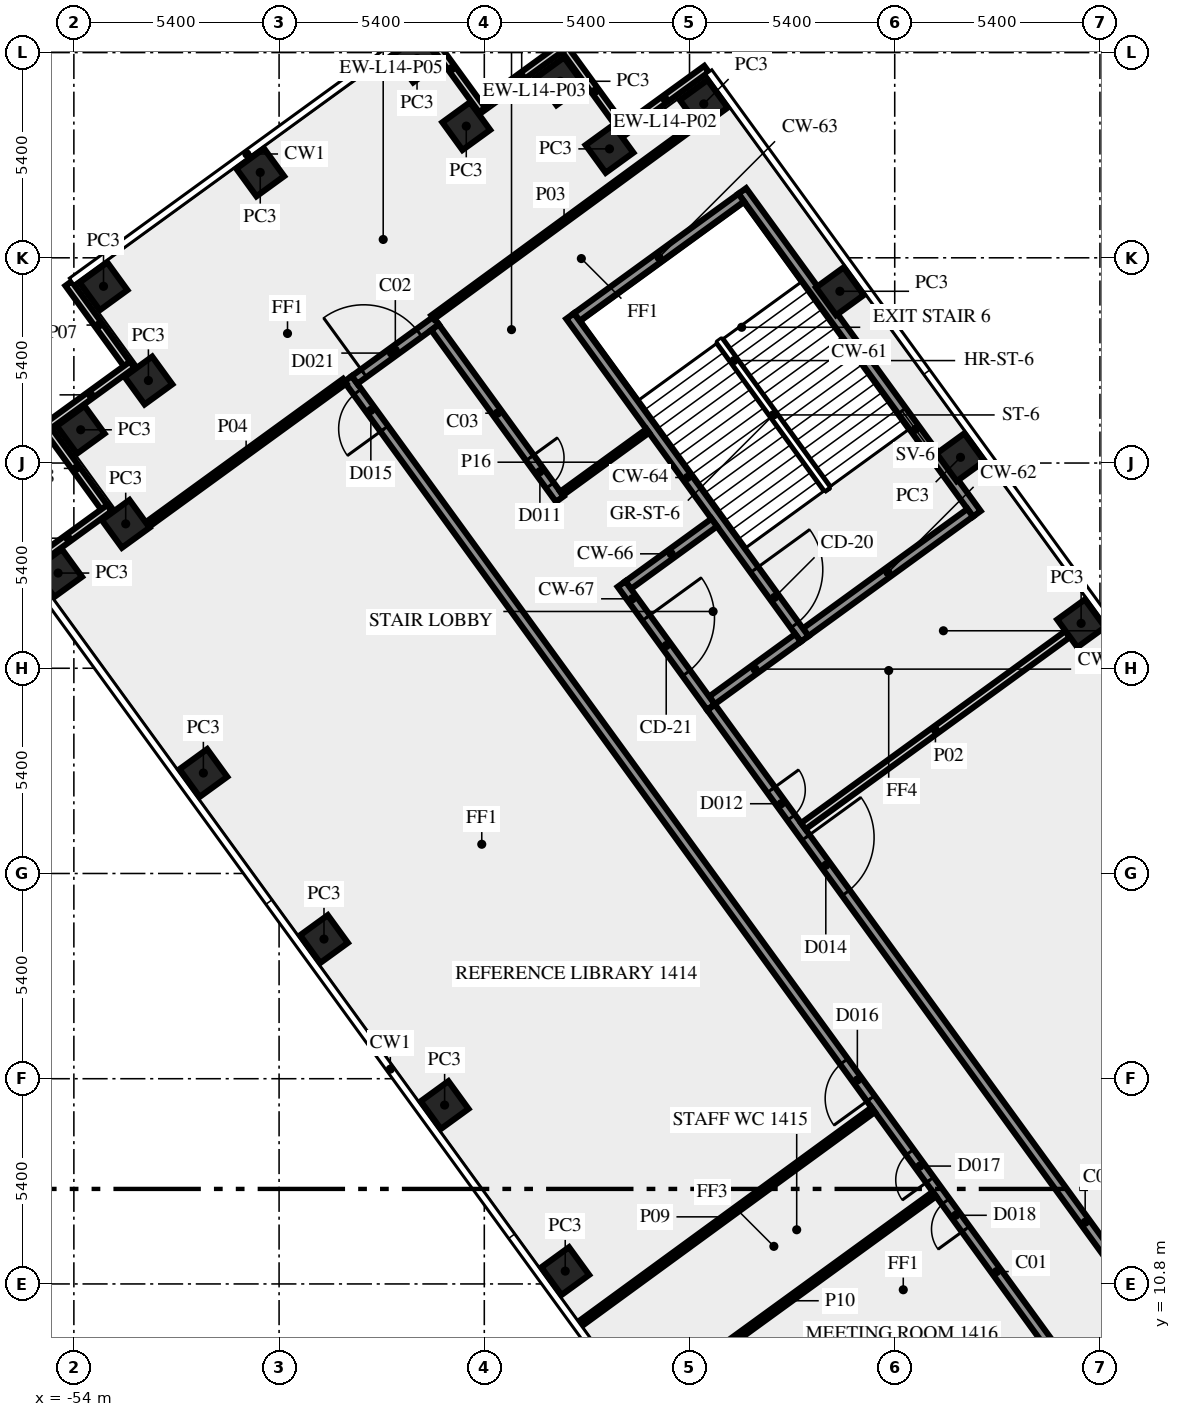
"""IFC4 building model, lengths in metres.
Left out: names, types, materials, properties, quantities, classifications, styles, units other than length and angle.
Written with IfcOpenShell. Run it as: python <this file> out.ifc"""

import sys

from ifc_helpers import new_model, si_unit, direction, frame, frame_2d, origin, origin_2d, place, context, subcontext, project, spatial, rectangle, extrude, element, fill, save


model = new_model("IFC4")
c1 = context("Model", 3, precision=1e-05, world=origin(), true_north=direction((0.0, 1.0)))
c2 = subcontext(c1, "Body", "Model", "MODEL_VIEW")
j1 = project(units=[si_unit("LENGTHUNIT", "METRE"), si_unit("PLANEANGLEUNIT", "RADIAN")], contexts=[c1])
p1 = place(None, origin())
s1 = spatial("IfcSite", under=j1, at=p1, CompositionType="ELEMENT")
p2 = place(p1, origin())
s2 = spatial("IfcBuilding", under=s1, at=p2, CompositionType="ELEMENT")
p3 = place(p2, frame((0.0, 0.0, 63.0)))
s3 = spatial("IfcBuildingStorey", under=s2, at=p3, CompositionType="ELEMENT", Elevation=63.0)
for number, where, z_axis, x_axis in (
    (1, (-27.495, 28.181, 0.0), (0.0, 0.0, 1.0), (-0.588, 0.809, 0.0)),
    (2, (-30.669, 32.55, 0.0), (0.0, 0.0, 1.0), (-0.588, 0.809, 0.0)),
    (3, (-33.843, 36.919, 0.0), (0.0, 0.0, 1.0), (-0.588, 0.809, 0.0)),
    (4, (-37.425, 41.85, 0.0), (0.0, 0.0, 1.0), (-0.588, 0.809, 0.0)),
    (5, (-39.906, 40.666, 0.0), (0.0, 0.0, 1.0), (-0.588, 0.809, 0.0)),
    (6, (-41.2, 42.445, 0.0), (0.0, 0.0, 1.0), (-0.588, 0.809, 0.0)),
    (7, (-43.675, 41.265, 0.0), (0.0, 0.0, 1.0), (-0.809, -0.588, 0.0)),
    (8, (-44.97, 43.045, 0.0), (0.0, 0.0, 1.0), (-0.809, -0.588, 0.0)),
    (9, (-49.096, 40.047, 0.0), (0.0, 0.0, 1.0), (-0.809, -0.588, 0.0)),
    (10, (-53.22, 37.05, 0.0), (0.0, 0.0, 1.0), (0.588, -0.809, 0.0)),
    (11, (-52.039, 34.571, 0.0), (0.0, 0.0, 1.0), (-0.809, -0.588, 0.0)),
    (12, (-53.82, 33.275, 0.0), (0.0, 0.0, 1.0), (0.588, -0.809, 0.0)),
    (13, (-52.636, 30.8, 0.0), (0.0, 0.0, 1.0), (-0.809, -0.588, 0.0)),
    (14, (-54.415, 29.505, 0.0), (0.0, 0.0, 1.0), (0.588, -0.809, 0.0)),
    (15, (-50.592, 24.243, 0.0), (0.0, 0.0, 1.0), (0.588, -0.809, 0.0)),
    (16, (-47.418, 19.875, 0.0), (0.0, 0.0, 1.0), (0.588, -0.809, 0.0)),
    (17, (-44.244, 15.506, 0.0), (0.0, 0.0, 1.0), (0.588, -0.809, 0.0)),
    (18, (-41.07, 11.137, 0.0), (0.0, 0.0, 1.0), (0.588, -0.809, 0.0)),
):
    element("IfcColumn", number, at=place(p3, frame(where, z_axis=z_axis, x_axis=x_axis)), inside=s3, PredefinedType="COLUMN", context=c2, shape_type="SweptSolid", body=[
        extrude(rectangle(XDim=0.9, YDim=0.9, at=origin_2d()), origin(), (0.0, 0.0, 1.0), 3.65),
    ])
p4 = place(p3, frame((-37.353, 42.768, 0.0), z_axis=(0.0, 0.0, 1.0), x_axis=(-0.809033161865, -0.587762999008, 0.0)))
e19 = element("IfcWall", 19, at=p4, inside=s3, PredefinedType="SOLIDWALL", context=c2, shape_type="SweptSolid", body=[
    extrude(rectangle(XDim=2.7, YDim=0.2, at=frame_2d((1.35, 0.0))), origin(), (0.0, 0.0, 1.0), 3.65),
])
p5 = place(p3, frame((-39.488, 41.094, 0.0), z_axis=(0.0, 0.0, 1.0), x_axis=(-0.587806000234, 0.809001919707, 0.0)))
e20 = element("IfcWall", 20, at=p5, inside=s3, PredefinedType="SOLIDWALL", context=c2, shape_type="SweptSolid", body=[
    extrude(rectangle(XDim=2.7, YDim=0.2, at=frame_2d((1.35, 0.0))), origin(), (0.0, 0.0, 1.0), 3.65),
])
for number, where, z_axis, x_axis in (
    (21, (-41.124, 43.366, 0.0), (0.0, 0.0, 1.0), (-0.809, -0.588, 0.0)),
    (22, (-43.259, 41.691, 0.0), (0.0, 0.0, 1.0), (-0.588, 0.809, 0.0)),
    (23, (-54.14, 37.123, 0.0), (0.0, 0.0, 1.0), (0.588, -0.809, 0.0)),
    (24, (-52.465, 34.987, 0.0), (0.0, 0.0, 1.0), (-0.809, -0.588, 0.0)),
):
    element("IfcWall", number, at=place(p3, frame(where, z_axis=z_axis, x_axis=x_axis)), inside=s3, PredefinedType="SOLIDWALL", context=c2, shape_type="SweptSolid", body=[
        extrude(rectangle(XDim=2.7, YDim=0.2, at=frame_2d((1.35, 0.0))), origin(), (0.0, 0.0, 1.0), 3.65),
    ])
p6 = place(p3, frame((-54.738, 33.351, 0.0), z_axis=(0.0, 0.0, 1.0), x_axis=(0.587779184282, -0.809021403008, 0.0)))
e25 = element("IfcWall", 25, at=p6, inside=s3, PredefinedType="SOLIDWALL", context=c2, shape_type="SweptSolid", body=[
    extrude(rectangle(XDim=2.7, YDim=0.2, at=frame_2d((1.35, 0.0))), origin(), (0.0, 0.0, 1.0), 3.65),
])
p7 = place(p3, frame((-53.063, 31.216, 0.0), z_axis=(0.0, 0.0, 1.0), x_axis=(-0.809033161865, -0.587762999008, 0.0)))
e26 = element("IfcWall", 26, at=p7, inside=s3, PredefinedType="SOLIDWALL", context=c2, shape_type="SweptSolid", body=[
    extrude(rectangle(XDim=2.7, YDim=0.2, at=frame_2d((1.35, 0.0))), origin(), (0.0, 0.0, 1.0), 3.65),
])
p8 = place(p3, frame((-30.24, 31.064, 0.0), z_axis=(0.0, 0.0, 1.0), x_axis=(-0.587795589702, 0.809009483706, 0.0)))
e27 = element("IfcWall", 27, at=p8, inside=s3, PredefinedType="SHEAR", context=c2, shape_type="SweptSolid", body=[
    extrude(rectangle(XDim=10.5, YDim=0.25, at=frame_2d((5.25, 0.0))), origin(), (0.0, 0.0, 1.0), 3.65),
])
p9 = place(p8, frame((2.15, 0.0, 1.0)))
e28 = element("IfcOpeningElement", 28, at=p9, cuts=e27, PredefinedType="OPENING", context=c2, shape_type="SweptSolid", body=[
    extrude(rectangle(XDim=1.2, YDim=1.2, at=frame_2d((0.6, 0.6))), frame((0.0, 0.135, 0.0), z_axis=(0.0, -1.0, 0.0), x_axis=(1.0, 0.0, 0.0)), (0.0, 0.0, 1.0), 0.27),
])
p10 = place(p3, frame((-30.414, 31.092, 0.0), z_axis=(0.0, 0.0, 1.0), x_axis=(-0.8089984606, -0.587810760999, 0.0)))
e29 = element("IfcWall", 29, at=p10, inside=s3, PredefinedType="SHEAR", context=c2, shape_type="SweptSolid", body=[
    extrude(rectangle(XDim=5.35, YDim=0.25, at=frame_2d((2.675, 0.0))), origin(), (0.0, 0.0, 1.0), 3.65),
])
p11 = place(p3, frame((-36.439, 39.384, 0.0), z_axis=(0.0, 0.0, 1.0), x_axis=(-0.809020161303, -0.587780893365, 0.0)))
e30 = element("IfcWall", 30, at=p11, inside=s3, PredefinedType="SHEAR", context=c2, shape_type="SweptSolid", body=[
    extrude(rectangle(XDim=5.35, YDim=0.25, at=frame_2d((2.675, 0.0))), origin(), (0.0, 0.0, 1.0), 3.65),
])
p12 = place(p3, frame((-40.942, 36.267, 0.0), z_axis=(0.0, 0.0, 1.0), x_axis=(0.587795589702, -0.809009483706, 0.0)))
e31 = element("IfcWall", 31, at=p12, inside=s3, PredefinedType="SHEAR", context=c2, shape_type="SweptSolid", body=[
    extrude(rectangle(XDim=10.5, YDim=0.25, at=frame_2d((5.25, 0.0))), origin(), (0.0, 0.0, 1.0), 3.65),
])
p13 = place(p12, frame((8.25, 0.0, 0.0)))
e32 = element("IfcOpeningElement", 32, at=p13, cuts=e31, PredefinedType="OPENING", context=c2, shape_type="SweptSolid", body=[
    extrude(rectangle(XDim=1.8, YDim=2.1, at=frame_2d((0.9, 1.05))), frame((0.0, 0.135, 0.0), z_axis=(0.0, -1.0, 0.0), x_axis=(1.0, 0.0, 0.0)), (0.0, 0.0, 1.0), 0.27),
])
for number, where, z_axis, x_axis in (
    (33, (-34.945, 27.8, 0.0), (0.0, 0.0, 1.0), (-0.809, -0.588, 0.0)),
    (34, (-37.149, 30.834, 0.0), (0.0, 0.0, 1.0), (-0.809, -0.588, 0.0)),
):
    element("IfcWall", number, at=place(p3, frame(where, z_axis=z_axis, x_axis=x_axis)), inside=s3, PredefinedType="SHEAR", context=c2, shape_type="SweptSolid", body=[
        extrude(rectangle(XDim=2.8, YDim=0.25, at=frame_2d((1.4, 0.0))), origin(), (0.0, 0.0, 1.0), 3.65),
    ])
p14 = place(p3, frame((-39.589, 29.216, 0.0), z_axis=(0.0, 0.0, 1.0), x_axis=(0.587772420479, -0.809026317077, 0.0)))
e35 = element("IfcWall", 35, at=p14, inside=s3, PredefinedType="SHEAR", context=c2, shape_type="SweptSolid", body=[
    extrude(rectangle(XDim=4.0, YDim=0.25, at=frame_2d((2.0, 0.0))), origin(), (0.0, 0.0, 1.0), 3.65),
])
p15 = place(p14, frame((1.1, 0.0, 0.0)))
e36 = element("IfcOpeningElement", 36, at=p15, cuts=e35, PredefinedType="OPENING", context=c2, shape_type="SweptSolid", body=[
    extrude(rectangle(XDim=1.8, YDim=2.1, at=frame_2d((0.9, 1.05))), frame((0.0, 0.135, 0.0), z_axis=(0.0, -1.0, 0.0), x_axis=(1.0, 0.0, 0.0)), (0.0, 0.0, 1.0), 0.27),
])
p16 = place(p3, frame((-20.531, -1.523, 0.0), z_axis=(0.0, 0.0, 1.0), x_axis=(-0.587784593204, 0.809017473231, 0.0)))
e37 = element("IfcWall", 37, at=p16, inside=s3, PredefinedType="SOLIDWALL", context=c2, shape_type="SweptSolid", body=[
    extrude(rectangle(XDim=44.67, YDim=0.25, at=frame_2d((22.335, 0.0))), origin(), (0.0, 0.0, 1.0), 3.65),
])
p17 = place(p16, frame((43.046, 0.0, 0.0)))
e38 = element("IfcOpeningElement", 38, at=p17, cuts=e37, PredefinedType="OPENING", context=c2, shape_type="SweptSolid", body=[
    extrude(rectangle(XDim=1.2, YDim=2.1, at=frame_2d((0.6, 1.05))), frame((0.0, 0.135, 0.0), z_axis=(0.0, -1.0, 0.0), x_axis=(1.0, 0.0, 0.0)), (0.0, 0.0, 1.0), 0.27),
])
p18 = place(p16, frame((21.266, 0.0, 0.0)))
e39 = element("IfcOpeningElement", 39, at=p18, cuts=e37, PredefinedType="OPENING", context=c2, shape_type="SweptSolid", body=[
    extrude(rectangle(XDim=1.2, YDim=2.1, at=frame_2d((0.6, 1.05))), frame((0.0, 0.135, 0.0), z_axis=(0.0, -1.0, 0.0), x_axis=(1.0, 0.0, 0.0)), (0.0, 0.0, 1.0), 0.27),
])
p19 = place(p16, frame((17.015, 0.0, 0.0)))
e40 = element("IfcOpeningElement", 40, at=p19, cuts=e37, PredefinedType="OPENING", context=c2, shape_type="SweptSolid", body=[
    extrude(rectangle(XDim=0.9, YDim=2.1, at=frame_2d((0.45, 1.05))), frame((0.0, 0.135, 0.0), z_axis=(0.0, -1.0, 0.0), x_axis=(1.0, 0.0, 0.0)), (0.0, 0.0, 1.0), 0.27),
])
p20 = place(p16, frame((2.924, 0.0, 0.0)))
e41 = element("IfcOpeningElement", 41, at=p20, cuts=e37, PredefinedType="OPENING", context=c2, shape_type="SweptSolid", body=[
    extrude(rectangle(XDim=1.8, YDim=2.1, at=frame_2d((0.9, 1.05))), frame((0.0, 0.135, 0.0), z_axis=(0.0, -1.0, 0.0), x_axis=(1.0, 0.0, 0.0)), (0.0, 0.0, 1.0), 0.27),
])
p21 = place(p16, frame((18.616, 0.0, 0.0)))
e42 = element("IfcOpeningElement", 42, at=p21, cuts=e37, PredefinedType="OPENING", context=c2, shape_type="SweptSolid", body=[
    extrude(rectangle(XDim=0.9, YDim=2.1, at=frame_2d((0.45, 1.05))), frame((0.0, 0.135, 0.0), z_axis=(0.0, -1.0, 0.0), x_axis=(1.0, 0.0, 0.0)), (0.0, 0.0, 1.0), 0.27),
])
p22 = place(p16, frame((7.816, 0.0, 0.0)))
e43 = element("IfcOpeningElement", 43, at=p22, cuts=e37, PredefinedType="OPENING", context=c2, shape_type="SweptSolid", body=[
    extrude(rectangle(XDim=0.9, YDim=2.1, at=frame_2d((0.45, 1.05))), frame((0.0, 0.135, 0.0), z_axis=(0.0, -1.0, 0.0), x_axis=(1.0, 0.0, 0.0)), (0.0, 0.0, 1.0), 0.27),
])
p23 = place(p3, frame((-46.613, 34.588, 0.0), z_axis=(0.0, 0.0, 1.0), x_axis=(0.808994936898, 0.587815610607, 0.0)))
e44 = element("IfcWall", 44, at=p23, inside=s3, PredefinedType="SOLIDWALL", context=c2, shape_type="SweptSolid", body=[
    extrude(rectangle(XDim=2.65, YDim=0.25, at=frame_2d((1.325, 0.0))), origin(), (0.0, 0.0, 1.0), 3.65),
])
p24 = place(p23, frame((0.299, 0.0, 0.0)))
e45 = element("IfcOpeningElement", 45, at=p24, cuts=e44, PredefinedType="OPENING", context=c2, shape_type="SweptSolid", body=[
    extrude(rectangle(XDim=1.8, YDim=2.1, at=frame_2d((0.9, 1.05))), frame((0.0, 0.135, 0.0), z_axis=(0.0, -1.0, 0.0), x_axis=(1.0, 0.0, 0.0)), (0.0, 0.0, 1.0), 0.27),
])
p25 = place(p3, frame((-44.497, 35.971, 0.0), z_axis=(0.0, 0.0, 1.0), x_axis=(0.587742866856, -0.809047787501, 0.0)))
e46 = element("IfcWall", 46, at=p25, inside=s3, PredefinedType="SOLIDWALL", context=c2, shape_type="SweptSolid", body=[
    extrude(rectangle(XDim=5.586, YDim=0.25, at=frame_2d((2.793, 0.0))), origin(), (0.0, 0.0, 1.0), 3.65),
])
p26 = place(p25, frame((4.245, 0.0, 0.0)))
e47 = element("IfcOpeningElement", 47, at=p26, cuts=e46, PredefinedType="OPENING", context=c2, shape_type="SweptSolid", body=[
    extrude(rectangle(XDim=0.9, YDim=2.1, at=frame_2d((0.45, 1.05))), frame((0.0, 0.135, 0.0), z_axis=(0.0, -1.0, 0.0), x_axis=(1.0, 0.0, 0.0)), (0.0, 0.0, 1.0), 0.27),
])
p27 = place(p3, frame((-37.232, 25.972, 0.0), z_axis=(0.0, 0.0, 1.0), x_axis=(0.587786323093, -0.809016216391, 0.0)))
e48 = element("IfcWall", 48, at=p27, inside=s3, PredefinedType="SOLIDWALL", context=c2, shape_type="SweptSolid", body=[
    extrude(rectangle(XDim=33.493, YDim=0.25, at=frame_2d((16.747, 0.0))), origin(), (0.0, 0.0, 1.0), 3.65),
])
p28 = place(p27, frame((28.301, 0.0, 0.0)))
e49 = element("IfcOpeningElement", 49, at=p28, cuts=e48, PredefinedType="OPENING", context=c2, shape_type="SweptSolid", body=[
    extrude(rectangle(XDim=1.8, YDim=2.1, at=frame_2d((0.9, 1.05))), frame((0.0, 0.135, 0.0), z_axis=(0.0, -1.0, 0.0), x_axis=(1.0, 0.0, 0.0)), (0.0, 0.0, 1.0), 0.27),
])
p29 = place(p27, frame((4.235, 0.0, 0.0)))
e50 = element("IfcOpeningElement", 50, at=p29, cuts=e48, PredefinedType="OPENING", context=c2, shape_type="SweptSolid", body=[
    extrude(rectangle(XDim=1.8, YDim=2.1, at=frame_2d((0.9, 1.05))), frame((0.0, 0.135, 0.0), z_axis=(0.0, -1.0, 0.0), x_axis=(1.0, 0.0, 0.0)), (0.0, 0.0, 1.0), 0.27),
])
p30 = place(p27, frame((2.685, 0.0, 0.0)))
e51 = element("IfcOpeningElement", 51, at=p30, cuts=e48, PredefinedType="OPENING", context=c2, shape_type="SweptSolid", body=[
    extrude(rectangle(XDim=0.9, YDim=2.1, at=frame_2d((0.45, 1.05))), frame((0.0, 0.135, 0.0), z_axis=(0.0, -1.0, 0.0), x_axis=(1.0, 0.0, 0.0)), (0.0, 0.0, 1.0), 0.27),
])
p31 = place(p3, frame((-27.851, 27.897, 0.0), z_axis=(0.0, 0.0, 1.0), x_axis=(-0.809030728677, -0.587766348183, 0.0)))
e52 = element("IfcWall", 52, at=p31, inside=s3, PredefinedType="SOLIDWALL", context=c2, shape_type="SweptSolid", body=[
    extrude(rectangle(XDim=8.596, YDim=0.2, at=frame_2d((4.298, 0.0))), origin(), (0.0, 0.0, 1.0), 3.65),
])
p32 = place(p3, frame((-44.559, 36.235, 0.0), z_axis=(0.0, 0.0, 1.0), x_axis=(0.806949857155, 0.590619952286, 0.0)))
e53 = element("IfcWall", 53, at=p32, inside=s3, PredefinedType="PARTITIONING", context=c2, shape_type="SweptSolid", body=[
    extrude(rectangle(XDim=8.57, YDim=0.12, at=frame_2d((4.285, 0.0))), origin(), (0.0, 0.0, 1.0), 3.65),
])
p33 = place(p3, frame((-52.062, 30.783, 0.0), z_axis=(0.0, 0.0, 1.0), x_axis=(0.808992766665, 0.58781859743, 0.0)))
e54 = element("IfcWall", 54, at=p33, inside=s3, PredefinedType="PARTITIONING", context=c2, shape_type="SweptSolid", body=[
    extrude(rectangle(XDim=6.414, YDim=0.15, at=frame_2d((3.207, 0.0))), origin(), (0.0, 0.0, 1.0), 3.65),
])
p34 = place(p3, frame((-40.68, 9.75, 0.0), z_axis=(0.0, 0.0, 1.0), x_axis=(0.807645841498, 0.589667868135, 0.0)))
e55 = element("IfcWall", 55, at=p34, inside=s3, PredefinedType="PARTITIONING", context=c2, shape_type="SweptSolid", body=[
    extrude(rectangle(XDim=9.551, YDim=0.15, at=frame_2d((4.775, 0.0))), origin(), (0.0, 0.0, 1.0), 2.75),
])
p35 = place(p3, frame((-31.356, 13.164, 0.0), z_axis=(0.0, 0.0, 1.0), x_axis=(-0.809102944047, -0.587666934526, 0.0)))
e56 = element("IfcWall", 56, at=p35, inside=s3, PredefinedType="PARTITIONING", context=c2, shape_type="SweptSolid", body=[
    extrude(rectangle(XDim=9.55, YDim=0.15, at=frame_2d((4.775, 0.0))), origin(), (0.0, 0.0, 1.0), 2.75),
])
p36 = place(p3, frame((-41.166, 31.599, 0.0), z_axis=(0.0, 0.0, 1.0), x_axis=(0.809090262332, 0.587684394381, 0.0)))
e57 = element("IfcWall", 57, at=p36, inside=s3, PredefinedType="PARTITIONING", context=c2, shape_type="SweptSolid", body=[
    extrude(rectangle(XDim=2.801, YDim=0.12, at=frame_2d((1.4, 0.0))), origin(), (0.0, 0.0, 1.0), 3.65),
])
p37 = place(p9, origin())
e58 = element("IfcWindow", 58, at=p37, inside=s3, PartitioningType="SINGLE_PANEL", PredefinedType="WINDOW", context=c2, shape_type="SweptSolid", body=[
    extrude(rectangle(XDim=1.2, YDim=1.2, at=frame_2d((0.6, 0.6))), frame((0.0, 0.03, 0.0), z_axis=(0.0, -1.0, 0.0), x_axis=(1.0, 0.0, 0.0)), (0.0, 0.0, 1.0), 0.06),
])
fill(e28, e58)
p38 = place(p13, origin())
e59 = element("IfcDoor", 59, at=p38, inside=s3, OperationType="DOUBLE_DOOR_SINGLE_SWING", PredefinedType="DOOR", context=c2, shape_type="SweptSolid", body=[
    extrude(rectangle(XDim=1.8, YDim=2.1, at=frame_2d((0.9, 1.05))), frame((0.0, 0.025, 0.0), z_axis=(0.0, -1.0, 0.0), x_axis=(1.0, 0.0, 0.0)), (0.0, 0.0, 1.0), 0.05),
])
fill(e32, e59)
p39 = place(p15, origin())
e60 = element("IfcDoor", 60, at=p39, inside=s3, OperationType="DOUBLE_DOOR_SINGLE_SWING", PredefinedType="DOOR", context=c2, shape_type="SweptSolid", body=[
    extrude(rectangle(XDim=1.8, YDim=2.1, at=frame_2d((0.9, 1.05))), frame((0.0, 0.025, 0.0), z_axis=(0.0, -1.0, 0.0), x_axis=(1.0, 0.0, 0.0)), (0.0, 0.0, 1.0), 0.05),
])
fill(e36, e60)
p40 = place(p29, origin())
e61 = element("IfcDoor", 61, at=p40, inside=s3, OperationType="DOUBLE_DOOR_SINGLE_SWING", PredefinedType="DOOR", context=c2, shape_type="SweptSolid", body=[
    extrude(rectangle(XDim=1.8, YDim=2.1, at=frame_2d((0.9, 1.05))), frame((0.0, 0.025, 0.0), z_axis=(0.0, -1.0, 0.0), x_axis=(1.0, 0.0, 0.0)), (0.0, 0.0, 1.0), 0.05),
])
fill(e50, e61)
p41 = place(p24, origin())
e62 = element("IfcDoor", 62, at=p41, inside=s3, OperationType="DOUBLE_DOOR_SINGLE_SWING", PredefinedType="DOOR", context=c2, shape_type="SweptSolid", body=[
    extrude(rectangle(XDim=1.8, YDim=2.1, at=frame_2d((0.9, 1.05))), frame((0.0, 0.025, 0.0), z_axis=(0.0, -1.0, 0.0), x_axis=(1.0, 0.0, 0.0)), (0.0, 0.0, 1.0), 0.05),
])
fill(e45, e62)
p42 = place(p26, origin())
e63 = element("IfcDoor", 63, at=p42, inside=s3, OperationType="SINGLE_SWING_RIGHT", PredefinedType="DOOR", context=c2, shape_type="SweptSolid", body=[
    extrude(rectangle(XDim=0.9, YDim=2.1, at=frame_2d((0.45, 1.05))), frame((0.0, 0.025, 0.0), z_axis=(0.0, -1.0, 0.0), x_axis=(1.0, 0.0, 0.0)), (0.0, 0.0, 1.0), 0.05),
])
fill(e47, e63)
p43 = place(p17, origin())
e64 = element("IfcDoor", 64, at=p43, inside=s3, OperationType="SINGLE_SWING_RIGHT", PredefinedType="DOOR", context=c2, shape_type="SweptSolid", body=[
    extrude(rectangle(XDim=1.2, YDim=2.1, at=frame_2d((0.6, 1.05))), frame((0.0, 0.025, 0.0), z_axis=(0.0, -1.0, 0.0), x_axis=(1.0, 0.0, 0.0)), (0.0, 0.0, 1.0), 0.05),
])
fill(e38, e64)
p44 = place(p18, origin())
e65 = element("IfcDoor", 65, at=p44, inside=s3, OperationType="SINGLE_SWING_LEFT", PredefinedType="DOOR", context=c2, shape_type="SweptSolid", body=[
    extrude(rectangle(XDim=1.2, YDim=2.1, at=frame_2d((0.6, 1.05))), frame((0.0, 0.025, 0.0), z_axis=(0.0, -1.0, 0.0), x_axis=(1.0, 0.0, 0.0)), (0.0, 0.0, 1.0), 0.05),
])
fill(e39, e65)
p45 = place(p19, origin())
e66 = element("IfcDoor", 66, at=p45, inside=s3, OperationType="SINGLE_SWING_RIGHT", PredefinedType="DOOR", context=c2, shape_type="SweptSolid", body=[
    extrude(rectangle(XDim=0.9, YDim=2.1, at=frame_2d((0.45, 1.05))), frame((0.0, 0.025, 0.0), z_axis=(0.0, -1.0, 0.0), x_axis=(1.0, 0.0, 0.0)), (0.0, 0.0, 1.0), 0.05),
])
fill(e40, e66)
p46 = place(p30, origin())
e67 = element("IfcDoor", 67, at=p46, inside=s3, OperationType="SINGLE_SWING_RIGHT", PredefinedType="DOOR", context=c2, shape_type="SweptSolid", body=[
    extrude(rectangle(XDim=0.9, YDim=2.1, at=frame_2d((0.45, 1.05))), frame((0.0, 0.025, 0.0), z_axis=(0.0, -1.0, 0.0), x_axis=(1.0, 0.0, 0.0)), (0.0, 0.0, 1.0), 0.05),
])
fill(e51, e67)
p47 = place(p21, origin())
e68 = element("IfcDoor", 68, at=p47, inside=s3, OperationType="SINGLE_SWING_LEFT", PredefinedType="DOOR", context=c2, shape_type="SweptSolid", body=[
    extrude(rectangle(XDim=0.9, YDim=2.1, at=frame_2d((0.45, 1.05))), frame((0.0, 0.025, 0.0), z_axis=(0.0, -1.0, 0.0), x_axis=(1.0, 0.0, 0.0)), (0.0, 0.0, 1.0), 0.05),
])
fill(e42, e68)
save(model, sys.argv[1])
